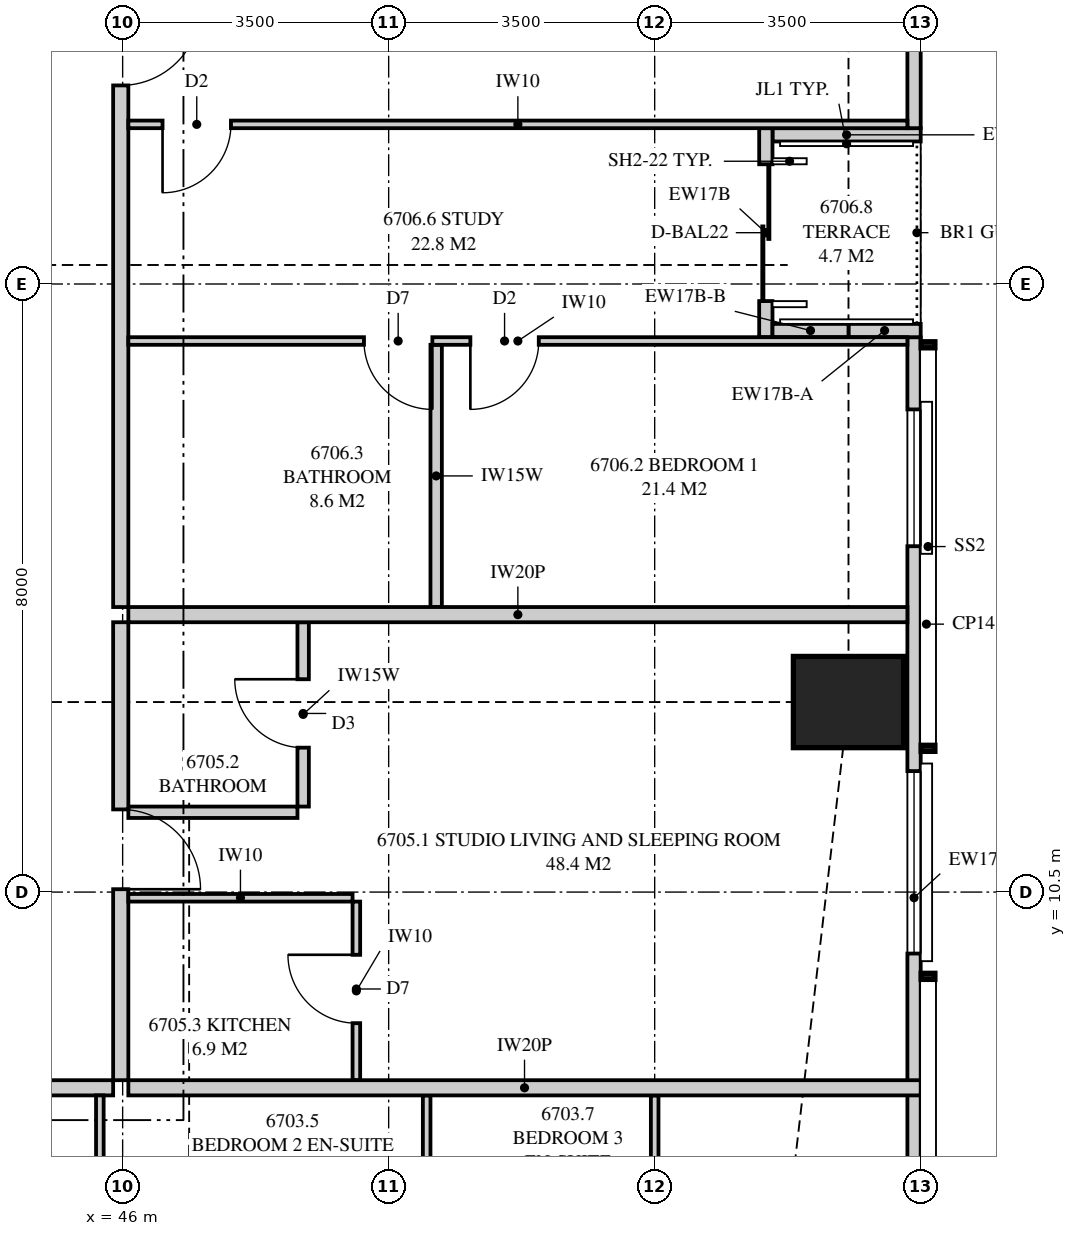
"""IFC4 building model, lengths in metres.
Left out: names, types, materials, properties, quantities, classifications, styles, units other than length and angle.
Written with IfcOpenShell. Run it as: python <this file> out.ifc"""

import sys

from ifc_helpers import new_model, si_unit, direction, frame, frame_2d, origin, origin_2d, place, context, subcontext, project, spatial, polyline, rectangle, outline, extrude, element, fill, save


model = new_model("IFC4")
c1 = context("Model", 3, precision=1e-05, world=origin(), true_north=direction((0.0, 1.0)))
c2 = subcontext(c1, "Body", "Model", "MODEL_VIEW")
j1 = project(units=[si_unit("LENGTHUNIT", "METRE"), si_unit("PLANEANGLEUNIT", "RADIAN")], contexts=[c1])
p1 = place(None, origin())
s1 = spatial("IfcSite", under=j1, at=p1, CompositionType="ELEMENT")
p2 = place(p1, origin())
s2 = spatial("IfcBuilding", under=s1, at=p2, CompositionType="ELEMENT")
p3 = place(p2, frame((0.0, 0.0, 245.95)))
s3 = spatial("IfcBuildingStorey", under=s2, at=p3, CompositionType="ELEMENT", Elevation=245.95)
p4 = place(p3, frame((55.55, 13.0, 0.0), z_axis=(0.0, 0.0, 1.0), x_axis=(1.0, 0.0, 0.0)))
e1 = element("IfcColumn", 1, at=p4, inside=s3, PredefinedType="COLUMN", context=c2, shape_type="SweptSolid", body=[
    extrude(rectangle(XDim=1.45, YDim=1.2, at=origin_2d()), origin(), (0.0, 0.0, 1.0), 3.5),
])
p5 = place(p3, frame((56.413, 3.051, 0.0), z_axis=(0.0, 0.0, 1.0), x_axis=(0.0, 1.0, 0.0)))
e2 = element("IfcWall", 2, at=p5, inside=s3, PredefinedType="SOLIDWALL", context=c2, shape_type="SweptSolid", body=[
    extrude(outline(polyline([(0.0, 0.0), (14.749, 0.0), (14.749, 2.3), (9.949, 2.3), (9.949, 3.26), (9.858, 3.26), (9.858, 2.3), (9.688, 2.3), (9.688, 3.26), (0.0, 3.26), (0.0, 0.0)])), frame((0.0, 0.087, 0.0), z_axis=(0.0, -1.0, 0.0), x_axis=(1.0, 0.0, 0.0)), (0.0, 0.0, 1.0), 0.175),
])
p6 = place(p5, frame((6.64, 0.0, 0.4)))
e3 = element("IfcOpeningElement", 3, at=p6, cuts=e2, PredefinedType="OPENING", context=c2, shape_type="SweptSolid", body=[
    extrude(rectangle(XDim=2.4, YDim=1.85, at=frame_2d((1.2, 0.925))), frame((0.0, 0.097, 0.0), z_axis=(0.0, -1.0, 0.0), x_axis=(1.0, 0.0, 0.0)), (0.0, 0.0, 1.0), 0.195),
])
p7 = place(p5, frame((11.999, 0.0, 0.4)))
e4 = element("IfcOpeningElement", 4, at=p7, cuts=e2, PredefinedType="OPENING", context=c2, shape_type="SweptSolid", body=[
    extrude(rectangle(XDim=1.8, YDim=1.85, at=frame_2d((0.9, 0.925))), frame((0.0, 0.097, 0.0), z_axis=(0.0, -1.0, 0.0), x_axis=(1.0, 0.0, 0.0)), (0.0, 0.0, 1.0), 0.195),
])
p8 = place(p3, frame((56.413, 20.55, 0.0), z_axis=(0.0, 0.0, 1.0), x_axis=(0.0, 1.0, 0.0)))
e5 = element("IfcWall", 5, at=p8, inside=s3, PredefinedType="SOLIDWALL", context=c2, shape_type="SweptSolid", body=[
    extrude(outline(polyline([(0.0, 0.0), (10.399, 0.0), (10.399, 3.26), (4.658, 3.26), (4.658, 2.3), (4.594, 2.3), (4.594, 3.26), (4.45, 3.26), (4.45, 2.3), (0.0, 2.3), (0.0, 0.0)])), frame((0.0, 0.087, 0.0), z_axis=(0.0, -1.0, 0.0), x_axis=(1.0, 0.0, 0.0)), (0.0, 0.0, 1.0), 0.175),
])
p9 = place(p8, frame((1.2, 0.0, 0.4)))
e6 = element("IfcOpeningElement", 6, at=p9, cuts=e5, PredefinedType="OPENING", context=c2, shape_type="SweptSolid", body=[
    extrude(rectangle(XDim=2.4, YDim=1.85, at=frame_2d((1.2, 0.925))), frame((0.0, 0.097, 0.0), z_axis=(0.0, -1.0, 0.0), x_axis=(1.0, 0.0, 0.0)), (0.0, 0.0, 1.0), 0.195),
])
p10 = place(p8, frame((5.988, 0.0, 0.4)))
e7 = element("IfcOpeningElement", 7, at=p10, cuts=e5, PredefinedType="OPENING", context=c2, shape_type="SweptSolid", body=[
    extrude(rectangle(XDim=1.8, YDim=1.85, at=frame_2d((0.9, 0.925))), frame((0.0, 0.097, 0.0), z_axis=(0.0, -1.0, 0.0), x_axis=(1.0, 0.0, 0.0)), (0.0, 0.0, 1.0), 0.195),
])
p11 = place(p3, frame((54.462, 17.8, 0.0), z_axis=(0.0, 0.0, 1.0), x_axis=(0.0, 1.0, 0.0)))
e8 = element("IfcWall", 8, at=p11, inside=s3, PredefinedType="SOLIDWALL", context=c2, shape_type="SweptSolid", body=[
    extrude(outline(polyline([(0.0, 0.0), (2.75, 0.0), (2.75, 3.26), (2.15, 3.26), (2.15, 2.66), (0.0, 2.66), (0.0, 0.0)])), frame((0.0, 0.087, 0.0), z_axis=(0.0, -1.0, 0.0), x_axis=(1.0, 0.0, 0.0)), (0.0, 0.0, 1.0), 0.175),
])
p12 = place(p11, frame((0.475, 0.0, 0.0)))
e9 = element("IfcOpeningElement", 9, at=p12, cuts=e8, PredefinedType="OPENING", context=c2, shape_type="SweptSolid", body=[
    extrude(rectangle(XDim=1.8, YDim=2.25, at=frame_2d((0.9, 1.125))), frame((0.0, 0.097, 0.0), z_axis=(0.0, -1.0, 0.0), x_axis=(1.0, 0.0, 0.0)), (0.0, 0.0, 1.0), 0.195),
])
p13 = place(p3, frame((56.5, 17.887, 0.0), z_axis=(0.0, 0.0, 1.0), x_axis=(-1.0, 0.0, 0.0)))
e10 = element("IfcWall", 10, at=p13, inside=s3, PredefinedType="SOLIDWALL", context=c2, shape_type="SweptSolid", body=[
    extrude(outline(polyline([(0.0, 0.0), (0.95, 0.0), (0.95, 2.3), (0.15, 2.3), (0.15, 3.26), (0.0, 3.26), (0.0, 0.0)])), frame((0.0, 0.087, 0.0), z_axis=(0.0, -1.0, 0.0), x_axis=(1.0, 0.0, 0.0)), (0.0, 0.0, 1.0), 0.175),
])
p14 = place(p3, frame((55.55, 17.887, 0.0), z_axis=(0.0, 0.0, 1.0), x_axis=(-1.0, 0.0, 0.0)))
e11 = element("IfcWall", 11, at=p14, inside=s3, PredefinedType="SOLIDWALL", context=c2, shape_type="SweptSolid", body=[
    extrude(outline(polyline([(0.0, 0.0), (1.0, 0.0), (1.0, 2.66), (0.8, 2.66), (0.8, 2.3), (0.0, 2.3), (0.0, 0.0)])), frame((0.0, 0.087, 0.0), z_axis=(0.0, -1.0, 0.0), x_axis=(1.0, 0.0, 0.0)), (0.0, 0.0, 1.0), 0.175),
])
p15 = place(p3, frame((56.5, 20.462, 0.0), z_axis=(0.0, 0.0, 1.0), x_axis=(-1.0, 0.0, 0.0)))
e12 = element("IfcWall", 12, at=p15, inside=s3, PredefinedType="SOLIDWALL", context=c2, shape_type="SweptSolid", body=[
    extrude(outline(polyline([(0.0, 0.0), (1.95, 0.0), (1.95, 3.26), (1.75, 3.26), (1.75, 2.3), (0.15, 2.3), (0.15, 3.26), (0.0, 3.26), (0.0, 0.0)])), frame((0.0, 0.087, 0.0), z_axis=(0.0, -1.0, 0.0), x_axis=(1.0, 0.0, 0.0)), (0.0, 0.0, 1.0), 0.175),
])
p16 = place(p3, frame((36.55, 7.925, 0.0), z_axis=(0.0, 0.0, 1.0), x_axis=(1.0, 0.0, 0.0)))
e13 = element("IfcWall", 13, at=p16, inside=s3, PredefinedType="PARTITIONING", context=c2, shape_type="SweptSolid", body=[
    extrude(outline(polyline([(0.0, 0.0), (9.325, 0.0), (9.325, 3.26), (9.325, 2.66), (9.015, 2.66), (9.015, 3.26), (2.01, 3.26), (2.01, 2.66), (0.0, 2.66), (0.0, 3.26), (0.0, 0.0)])), frame((0.0, 0.1, 0.0), z_axis=(0.0, -1.0, 0.0), x_axis=(1.0, 0.0, 0.0)), (0.0, 0.0, 1.0), 0.2),
])
p17 = place(p16, frame((4.15, 0.0, 0.0)))
e14 = element("IfcOpeningElement", 14, at=p17, cuts=e13, PredefinedType="OPENING", context=c2, shape_type="SweptSolid", body=[
    extrude(rectangle(XDim=1.05, YDim=2.2, at=frame_2d((0.525, 1.1))), frame((0.0, 0.11, 0.0), z_axis=(0.0, -1.0, 0.0), x_axis=(1.0, 0.0, 0.0)), (0.0, 0.0, 1.0), 0.22),
])
p18 = place(p3, frame((45.7, 0.175, 0.0), z_axis=(0.0, 0.0, 1.0), x_axis=(0.0, 1.0, 0.0)))
e15 = element("IfcWall", 15, at=p18, inside=s3, PredefinedType="PARTITIONING", context=c2, shape_type="SweptSolid", body=[
    extrude(outline(polyline([(0.0, 0.0), (7.65, 0.0), (7.65, 3.26), (7.65, 2.66), (1.635, 2.66), (1.635, 2.3), (0.0, 2.3), (0.0, 3.26), (0.0, 0.0)])), frame((0.0, 0.05, 0.0), z_axis=(0.0, -1.0, 0.0), x_axis=(1.0, 0.0, 0.0)), (0.0, 0.0, 1.0), 0.1),
])
p19 = place(p18, frame((3.8, 0.0, 0.0)))
e16 = element("IfcOpeningElement", 16, at=p19, cuts=e15, PredefinedType="OPENING", context=c2, shape_type="SweptSolid", body=[
    extrude(rectangle(XDim=0.9, YDim=2.1, at=frame_2d((0.45, 1.05))), frame((0.0, 0.06, 0.0), z_axis=(0.0, -1.0, 0.0), x_axis=(1.0, 0.0, 0.0)), (0.0, 0.0, 1.0), 0.12),
])
p20 = place(p3, frame((50.0, 0.175, 0.0), z_axis=(0.0, 0.0, 1.0), x_axis=(0.0, 1.0, 0.0)))
e17 = element("IfcWall", 17, at=p20, inside=s3, PredefinedType="PARTITIONING", context=c2, shape_type="SweptSolid", body=[
    extrude(outline(polyline([(0.0, 0.0), (7.65, 0.0), (7.65, 3.26), (2.177, 3.26), (2.177, 2.3), (0.432, 2.3), (0.432, 3.26), (0.0, 3.26), (0.0, 0.0)])), frame((0.0, 0.05, 0.0), z_axis=(0.0, -1.0, 0.0), x_axis=(1.0, 0.0, 0.0)), (0.0, 0.0, 1.0), 0.1),
])
p21 = place(p20, frame((3.8, 0.0, 0.0)))
e18 = element("IfcOpeningElement", 18, at=p21, cuts=e17, PredefinedType="OPENING", context=c2, shape_type="SweptSolid", body=[
    extrude(rectangle(XDim=0.9, YDim=2.1, at=frame_2d((0.45, 1.05))), frame((0.0, 0.06, 0.0), z_axis=(0.0, -1.0, 0.0), x_axis=(1.0, 0.0, 0.0)), (0.0, 0.0, 1.0), 0.12),
])
p22 = place(p3, frame((53.0, 0.175, 0.0), z_axis=(0.0, 0.0, 1.0), x_axis=(0.0, 1.0, 0.0)))
e19 = element("IfcWall", 19, at=p22, inside=s3, PredefinedType="PARTITIONING", context=c2, shape_type="SweptSolid", body=[
    extrude(outline(polyline([(0.0, 0.0), (7.65, 0.0), (7.65, 3.26), (2.685, 3.26), (2.685, 2.3), (0.941, 2.3), (0.941, 3.26), (0.0, 3.26), (0.0, 0.0)])), frame((0.0, 0.05, 0.0), z_axis=(0.0, -1.0, 0.0), x_axis=(1.0, 0.0, 0.0)), (0.0, 0.0, 1.0), 0.1),
])
p23 = place(p22, frame((3.8, 0.0, 0.0)))
e20 = element("IfcOpeningElement", 20, at=p23, cuts=e19, PredefinedType="OPENING", context=c2, shape_type="SweptSolid", body=[
    extrude(rectangle(XDim=0.9, YDim=2.1, at=frame_2d((0.45, 1.05))), frame((0.0, 0.06, 0.0), z_axis=(0.0, -1.0, 0.0), x_axis=(1.0, 0.0, 0.0)), (0.0, 0.0, 1.0), 0.12),
])
p24 = place(p3, frame((46.075, 7.925, 0.0), z_axis=(0.0, 0.0, 1.0), x_axis=(1.0, 0.0, 0.0)))
e21 = element("IfcWall", 21, at=p24, inside=s3, PredefinedType="PARTITIONING", context=c2, shape_type="SweptSolid", body=[
    extrude(outline(polyline([(0.0, 0.0), (10.425, 0.0), (10.425, 3.26), (9.8, 3.26), (9.8, 2.3), (7.968, 2.3), (7.968, 3.26), (2.11, 3.26), (2.11, 2.66), (0.0, 2.66), (0.0, 3.26), (0.0, 0.0)])), frame((0.0, 0.1, 0.0), z_axis=(0.0, -1.0, 0.0), x_axis=(1.0, 0.0, 0.0)), (0.0, 0.0, 1.0), 0.2),
])
p25 = place(p3, frame((56.325, 14.15, 0.0), z_axis=(0.0, 0.0, 1.0), x_axis=(-1.0, 0.0, 0.0)))
e22 = element("IfcWall", 22, at=p25, inside=s3, PredefinedType="PARTITIONING", context=c2, shape_type="SweptSolid", body=[
    extrude(outline(polyline([(0.0, 0.0), (10.25, 0.0), (10.25, 3.26), (10.25, 2.66), (1.685, 2.66), (1.685, 2.3), (0.0, 2.3), (0.0, 3.26), (0.0, 0.0)])), frame((0.0, 0.1, 0.0), z_axis=(0.0, -1.0, 0.0), x_axis=(1.0, 0.0, 0.0)), (0.0, 0.0, 1.0), 0.2),
])
p26 = place(p3, frame((45.975, 8.025, 0.0), z_axis=(0.0, 0.0, 1.0), x_axis=(0.0, 1.0, 0.0)))
e23 = element("IfcWall", 23, at=p26, inside=s3, PredefinedType="PARTITIONING", context=c2, shape_type="SweptSolid", body=[
    extrude(outline(polyline([(0.0, 0.0), (6.025, 0.0), (6.025, 3.26), (6.025, 2.66), (5.085, 2.66), (0.0, 2.66), (0.0, 3.26), (0.0, 0.0)])), frame((0.0, 0.1, 0.0), z_axis=(0.0, -1.0, 0.0), x_axis=(1.0, 0.0, 0.0)), (0.0, 0.0, 1.0), 0.2),
])
p27 = place(p26, frame((2.512, 0.0, 0.0)))
e24 = element("IfcOpeningElement", 24, at=p27, cuts=e23, PredefinedType="OPENING", context=c2, shape_type="SweptSolid", body=[
    extrude(rectangle(XDim=1.05, YDim=2.2, at=frame_2d((0.525, 1.1))), frame((0.0, 0.11, 0.0), z_axis=(0.0, -1.0, 0.0), x_axis=(1.0, 0.0, 0.0)), (0.0, 0.0, 1.0), 0.22),
])
p28 = place(p3, frame((48.375, 11.625, 0.0), z_axis=(0.0, 0.0, 1.0), x_axis=(0.0, 1.0, 0.0)))
e25 = element("IfcWall", 25, at=p28, inside=s3, PredefinedType="PLUMBINGWALL", context=c2, shape_type="SweptSolid", body=[
    extrude(outline(polyline([(0.0, 0.0), (2.425, 0.0), (2.425, 3.26), (2.425, 2.66), (0.09, 2.66), (0.09, 3.26), (0.0, 3.26), (0.0, 0.0)])), frame((0.0, 0.075, 0.0), z_axis=(0.0, -1.0, 0.0), x_axis=(1.0, 0.0, 0.0)), (0.0, 0.0, 1.0), 0.15),
])
p29 = place(p28, frame((0.775, 0.0, 0.0)))
e26 = element("IfcOpeningElement", 26, at=p29, cuts=e25, PredefinedType="OPENING", context=c2, shape_type="SweptSolid", body=[
    extrude(rectangle(XDim=0.9, YDim=2.1, at=frame_2d((0.45, 1.05))), frame((0.0, 0.085, 0.0), z_axis=(0.0, -1.0, 0.0), x_axis=(1.0, 0.0, 0.0)), (0.0, 0.0, 1.0), 0.17),
])
p30 = place(p3, frame((48.3, 11.55, 0.0), z_axis=(0.0, 0.0, 1.0), x_axis=(-1.0, 0.0, 0.0)))
e27 = element("IfcWall", 27, at=p30, inside=s3, PredefinedType="PLUMBINGWALL", context=c2, shape_type="SweptSolid", body=[
    extrude(outline(polyline([(0.0, 0.0), (2.225, 0.0), (2.225, 3.26), (2.225, 2.66), (0.14, 2.66), (0.14, 3.26), (0.0, 3.26), (0.0, 0.0)])), frame((0.0, 0.075, 0.0), z_axis=(0.0, -1.0, 0.0), x_axis=(1.0, 0.0, 0.0)), (0.0, 0.0, 1.0), 0.15),
])
p31 = place(p3, frame((49.075, 8.025, 0.0), z_axis=(0.0, 0.0, 1.0), x_axis=(0.0, 1.0, 0.0)))
e28 = element("IfcWall", 28, at=p31, inside=s3, PredefinedType="PARTITIONING", context=c2, shape_type="SweptSolid", body=[
    extrude(rectangle(XDim=2.35, YDim=0.1, at=frame_2d((1.175, 0.0))), origin(), (0.0, 0.0, 1.0), 3.26),
])
p32 = place(p31, frame((0.75, 0.0, 0.0)))
e29 = element("IfcOpeningElement", 29, at=p32, cuts=e28, PredefinedType="OPENING", context=c2, shape_type="SweptSolid", body=[
    extrude(rectangle(XDim=0.9, YDim=2.1, at=frame_2d((0.45, 1.05))), frame((0.0, 0.06, 0.0), z_axis=(0.0, -1.0, 0.0), x_axis=(1.0, 0.0, 0.0)), (0.0, 0.0, 1.0), 0.12),
])
p33 = place(p3, frame((49.025, 10.425, 0.0), z_axis=(0.0, 0.0, 1.0), x_axis=(-1.0, 0.0, 0.0)))
e30 = element("IfcWall", 30, at=p33, inside=s3, PredefinedType="PARTITIONING", context=c2, shape_type="SweptSolid", body=[
    extrude(outline(polyline([(0.0, 0.0), (2.95, 0.0), (2.95, 3.26), (2.95, 2.66), (0.89, 2.66), (0.89, 3.26), (0.0, 3.26), (0.0, 0.0)])), frame((0.0, 0.05, 0.0), z_axis=(0.0, -1.0, 0.0), x_axis=(1.0, 0.0, 0.0)), (0.0, 0.0, 1.0), 0.1),
])
p34 = place(p3, frame((45.975, 14.25, 0.0), z_axis=(0.0, 0.0, 1.0), x_axis=(0.0, 1.0, 0.0)))
e31 = element("IfcWall", 31, at=p34, inside=s3, PredefinedType="PARTITIONING", context=c2, shape_type="SweptSolid", body=[
    extrude(outline(polyline([(0.0, 0.0), (10.75, 0.0), (10.75, 2.66), (9.44, 2.66), (9.44, 3.26), (5.81, 3.26), (5.81, 2.66), (3.19, 2.66), (3.19, 3.26), (0.06, 3.26), (0.06, 2.66), (0.0, 2.66), (0.0, 0.0)])), frame((0.0, 0.1, 0.0), z_axis=(0.0, -1.0, 0.0), x_axis=(1.0, 0.0, 0.0)), (0.0, 0.0, 1.0), 0.2),
])
p35 = place(p34, frame((6.863, 0.0, 0.0)))
e32 = element("IfcOpeningElement", 32, at=p35, cuts=e31, PredefinedType="OPENING", context=c2, shape_type="SweptSolid", body=[
    extrude(rectangle(XDim=1.05, YDim=2.2, at=frame_2d((0.525, 1.1))), frame((0.0, 0.11, 0.0), z_axis=(0.0, -1.0, 0.0), x_axis=(1.0, 0.0, 0.0)), (0.0, 0.0, 1.0), 0.22),
])
p36 = place(p3, frame((56.325, 17.75, 0.0), z_axis=(0.0, 0.0, 1.0), x_axis=(-1.0, 0.0, 0.0)))
e33 = element("IfcWall", 33, at=p36, inside=s3, PredefinedType="PARTITIONING", context=c2, shape_type="SweptSolid", body=[
    extrude(outline(polyline([(0.0, 0.0), (10.25, 0.0), (10.25, 3.26), (10.25, 2.66), (1.635, 2.66), (1.635, 2.3), (0.0, 2.3), (0.0, 3.26), (0.0, 0.0)])), frame((0.0, 0.05, 0.0), z_axis=(0.0, -1.0, 0.0), x_axis=(1.0, 0.0, 0.0)), (0.0, 0.0, 1.0), 0.1),
])
p37 = place(p36, frame((4.85, 0.0, 0.0)))
e34 = element("IfcOpeningElement", 34, at=p37, cuts=e33, PredefinedType="OPENING", context=c2, shape_type="SweptSolid", body=[
    extrude(rectangle(XDim=0.9, YDim=2.1, at=frame_2d((0.45, 1.05))), frame((0.0, 0.06, 0.0), z_axis=(0.0, -1.0, 0.0), x_axis=(1.0, 0.0, 0.0)), (0.0, 0.0, 1.0), 0.12),
])
p38 = place(p36, frame((6.25, 0.0, 0.0)))
e35 = element("IfcOpeningElement", 35, at=p38, cuts=e33, PredefinedType="OPENING", context=c2, shape_type="SweptSolid", body=[
    extrude(rectangle(XDim=0.9, YDim=2.1, at=frame_2d((0.45, 1.05))), frame((0.0, 0.06, 0.0), z_axis=(0.0, -1.0, 0.0), x_axis=(1.0, 0.0, 0.0)), (0.0, 0.0, 1.0), 0.12),
])
p39 = place(p3, frame((50.125, 14.25, 0.0), z_axis=(0.0, 0.0, 1.0), x_axis=(0.0, 1.0, 0.0)))
e36 = element("IfcWall", 36, at=p39, inside=s3, PredefinedType="PLUMBINGWALL", context=c2, shape_type="SweptSolid", body=[
    extrude(outline(polyline([(0.0, 0.0), (3.45, 0.0), (3.45, 3.26), (3.45, 2.66), (3.215, 2.66), (3.215, 3.26), (0.035, 3.26), (0.035, 2.66), (0.0, 2.66), (0.0, 3.26), (0.0, 0.0)])), frame((0.0, 0.075, 0.0), z_axis=(0.0, -1.0, 0.0), x_axis=(1.0, 0.0, 0.0)), (0.0, 0.0, 1.0), 0.15),
])
p40 = place(p3, frame((56.325, 20.6, 0.0), z_axis=(0.0, 0.0, 1.0), x_axis=(-1.0, 0.0, 0.0)))
e37 = element("IfcWall", 37, at=p40, inside=s3, PredefinedType="PARTITIONING", context=c2, shape_type="SweptSolid", body=[
    extrude(outline(polyline([(0.0, 0.0), (10.25, 0.0), (10.25, 3.26), (1.635, 3.26), (1.635, 2.3), (0.0, 2.3), (0.0, 3.26), (0.0, 0.0)])), frame((0.0, 0.05, 0.0), z_axis=(0.0, -1.0, 0.0), x_axis=(1.0, 0.0, 0.0)), (0.0, 0.0, 1.0), 0.1),
])
p41 = place(p40, frame((8.9, 0.0, 0.0)))
e38 = element("IfcOpeningElement", 38, at=p41, cuts=e37, PredefinedType="OPENING", context=c2, shape_type="SweptSolid", body=[
    extrude(rectangle(XDim=0.9, YDim=2.1, at=frame_2d((0.45, 1.05))), frame((0.0, 0.06, 0.0), z_axis=(0.0, -1.0, 0.0), x_axis=(1.0, 0.0, 0.0)), (0.0, 0.0, 1.0), 0.12),
])
p42 = place(p6, origin())
e39 = element("IfcWindow", 39, at=p42, inside=s3, PartitioningType="SINGLE_PANEL", PredefinedType="WINDOW", context=c2, shape_type="SweptSolid", body=[
    extrude(rectangle(XDim=2.4, YDim=1.85, at=frame_2d((1.2, 0.925))), frame((0.0, 0.03, 0.0), z_axis=(0.0, -1.0, 0.0), x_axis=(1.0, 0.0, 0.0)), (0.0, 0.0, 1.0), 0.06),
])
fill(e3, e39)
p43 = place(p7, origin())
e40 = element("IfcWindow", 40, at=p43, inside=s3, PartitioningType="SINGLE_PANEL", PredefinedType="WINDOW", context=c2, shape_type="SweptSolid", body=[
    extrude(rectangle(XDim=1.8, YDim=1.85, at=frame_2d((0.9, 0.925))), frame((0.0, 0.03, 0.0), z_axis=(0.0, -1.0, 0.0), x_axis=(1.0, 0.0, 0.0)), (0.0, 0.0, 1.0), 0.06),
])
fill(e4, e40)
p44 = place(p12, origin())
e41 = element("IfcDoor", 41, at=p44, inside=s3, OperationType="SLIDING_TO_LEFT", PredefinedType="DOOR", context=c2, shape_type="SweptSolid", body=[
    extrude(rectangle(XDim=1.8, YDim=2.25, at=frame_2d((0.9, 1.125))), frame((0.0, 0.025, 0.0), z_axis=(0.0, -1.0, 0.0), x_axis=(1.0, 0.0, 0.0)), (0.0, 0.0, 1.0), 0.05),
])
fill(e9, e41)
p45 = place(p27, frame((1.05, 0.0, 0.0), z_axis=(0.0, 0.0, 1.0), x_axis=(-1.0, 0.0, 0.0)))
e42 = element("IfcDoor", 42, at=p45, inside=s3, OperationType="SINGLE_SWING_RIGHT", PredefinedType="DOOR", context=c2, shape_type="SweptSolid", body=[
    extrude(rectangle(XDim=1.05, YDim=2.2, at=frame_2d((0.525, 1.1))), frame((0.0, 0.025, 0.0), z_axis=(0.0, -1.0, 0.0), x_axis=(1.0, 0.0, 0.0)), (0.0, 0.0, 1.0), 0.05),
])
fill(e24, e42)
p46 = place(p29, origin())
e43 = element("IfcDoor", 43, at=p46, inside=s3, OperationType="SINGLE_SWING_RIGHT", PredefinedType="DOOR", context=c2, shape_type="SweptSolid", body=[
    extrude(rectangle(XDim=0.9, YDim=2.1, at=frame_2d((0.45, 1.05))), frame((0.0, 0.025, 0.0), z_axis=(0.0, -1.0, 0.0), x_axis=(1.0, 0.0, 0.0)), (0.0, 0.0, 1.0), 0.05),
])
fill(e26, e43)
p47 = place(p32, origin())
e44 = element("IfcDoor", 44, at=p47, inside=s3, OperationType="SINGLE_SWING_RIGHT", PredefinedType="DOOR", context=c2, shape_type="SweptSolid", body=[
    extrude(rectangle(XDim=0.9, YDim=2.1, at=frame_2d((0.45, 1.05))), frame((0.0, 0.025, 0.0), z_axis=(0.0, -1.0, 0.0), x_axis=(1.0, 0.0, 0.0)), (0.0, 0.0, 1.0), 0.05),
])
fill(e29, e44)
p48 = place(p35, frame((1.05, 0.0, 0.0), z_axis=(0.0, 0.0, 1.0), x_axis=(-1.0, 0.0, 0.0)))
e45 = element("IfcDoor", 45, at=p48, inside=s3, OperationType="SINGLE_SWING_LEFT", PredefinedType="DOOR", context=c2, shape_type="SweptSolid", body=[
    extrude(rectangle(XDim=1.05, YDim=2.2, at=frame_2d((0.525, 1.1))), frame((0.0, 0.025, 0.0), z_axis=(0.0, -1.0, 0.0), x_axis=(1.0, 0.0, 0.0)), (0.0, 0.0, 1.0), 0.05),
])
fill(e32, e45)
p49 = place(p37, origin())
e46 = element("IfcDoor", 46, at=p49, inside=s3, OperationType="SINGLE_SWING_RIGHT", PredefinedType="DOOR", context=c2, shape_type="SweptSolid", body=[
    extrude(rectangle(XDim=0.9, YDim=2.1, at=frame_2d((0.45, 1.05))), frame((0.0, 0.025, 0.0), z_axis=(0.0, -1.0, 0.0), x_axis=(1.0, 0.0, 0.0)), (0.0, 0.0, 1.0), 0.05),
])
fill(e34, e46)
p50 = place(p38, origin())
e47 = element("IfcDoor", 47, at=p50, inside=s3, OperationType="SINGLE_SWING_LEFT", PredefinedType="DOOR", context=c2, shape_type="SweptSolid", body=[
    extrude(rectangle(XDim=0.9, YDim=2.1, at=frame_2d((0.45, 1.05))), frame((0.0, 0.025, 0.0), z_axis=(0.0, -1.0, 0.0), x_axis=(1.0, 0.0, 0.0)), (0.0, 0.0, 1.0), 0.05),
])
fill(e35, e47)
p51 = place(p41, origin())
e48 = element("IfcDoor", 48, at=p51, inside=s3, OperationType="SINGLE_SWING_RIGHT", PredefinedType="DOOR", context=c2, shape_type="SweptSolid", body=[
    extrude(rectangle(XDim=0.9, YDim=2.1, at=frame_2d((0.45, 1.05))), frame((0.0, 0.025, 0.0), z_axis=(0.0, -1.0, 0.0), x_axis=(1.0, 0.0, 0.0)), (0.0, 0.0, 1.0), 0.05),
])
fill(e38, e48)
save(model, sys.argv[1])
